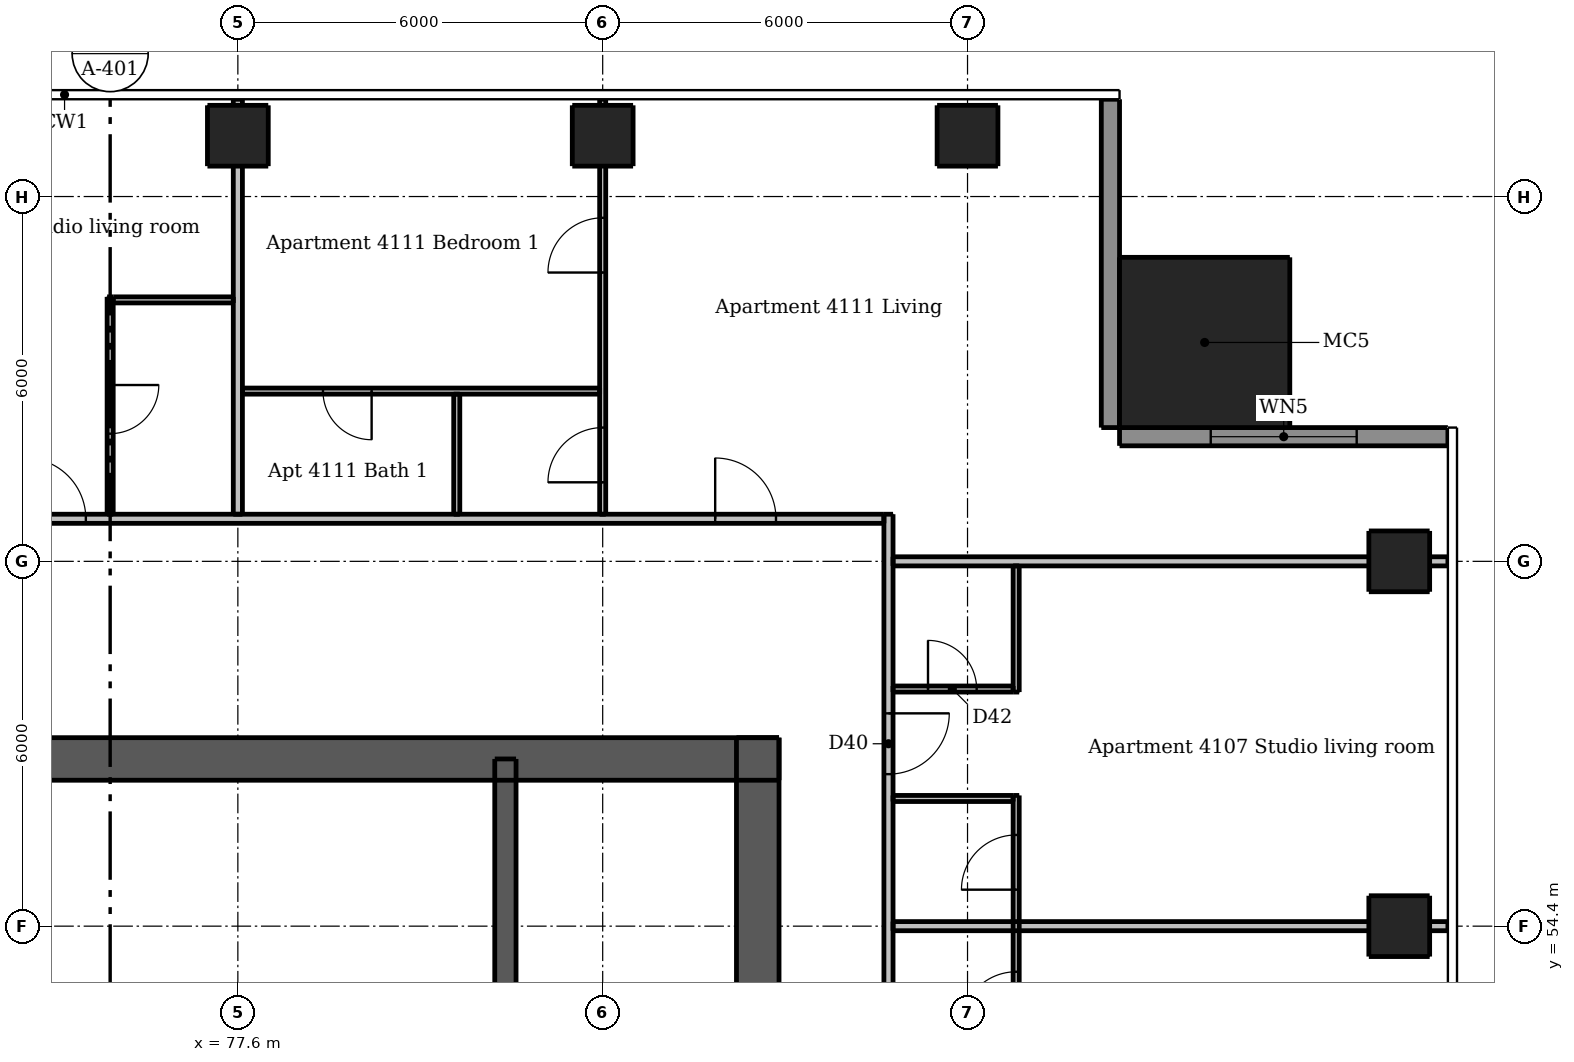
"""IFC4 building model, lengths in metres.
Left out: names, types, materials, properties, quantities, classifications, styles, units other than length and angle.
Written with IfcOpenShell. Run it as: python <this file> out.ifc"""

import sys

from ifc_helpers import new_model, si_unit, direction, frame, frame_2d, origin, origin_2d, place, context, subcontext, project, spatial, rectangle, extrude, element, fill, save


model = new_model("IFC4")
c1 = context("Model", 3, precision=1e-05, world=origin(), true_north=direction((0.0, 1.0)))
c2 = subcontext(c1, "Body", "Model", "MODEL_VIEW")
j1 = project(units=[si_unit("LENGTHUNIT", "METRE"), si_unit("PLANEANGLEUNIT", "RADIAN")], contexts=[c1])
p1 = place(None, origin())
s1 = spatial("IfcSite", under=j1, at=p1, CompositionType="ELEMENT")
p2 = place(p1, origin())
s2 = spatial("IfcBuilding", under=s1, at=p2, CompositionType="ELEMENT")
p3 = place(p2, frame((0.0, 0.0, 154.9)))
s3 = spatial("IfcBuildingStorey", under=s2, at=p3, CompositionType="ELEMENT", Elevation=154.9)
p4 = place(p3, frame((62.5, 57.15, 0.0), z_axis=(0.0, 0.0, 1.0), x_axis=(1.0, 0.0, 0.0)))
e1 = element("IfcWall", 1, at=p4, inside=s3, PredefinedType="SHEAR", context=c2, shape_type="SweptSolid", body=[
    extrude(rectangle(XDim=24.0, YDim=0.7, at=frame_2d((12.0, 0.0))), origin(), (0.0, 0.0, 1.0), 3.05),
])
p5 = place(p4, frame((20.938, 0.0, 0.0)))
e2 = element("IfcOpeningElement", 2, at=p5, cuts=e1, PredefinedType="OPENING", context=c2, shape_type="SweptSolid", body=[
    extrude(rectangle(XDim=1.1, YDim=2.1, at=frame_2d((0.55, 1.05))), frame((0.0, 0.36, 0.0), z_axis=(0.0, -1.0, 0.0), x_axis=(1.0, 0.0, 0.0)), (0.0, 0.0, 1.0), 0.72),
])
p6 = place(p4, frame((1.962, 0.0, 0.0)))
e3 = element("IfcOpeningElement", 3, at=p6, cuts=e1, PredefinedType="OPENING", context=c2, shape_type="SweptSolid", body=[
    extrude(rectangle(XDim=1.1, YDim=2.1, at=frame_2d((0.55, 1.05))), frame((0.0, 0.36, 0.0), z_axis=(0.0, -1.0, 0.0), x_axis=(1.0, 0.0, 0.0)), (0.0, 0.0, 1.0), 0.72),
])
p7 = place(p4, frame((11.55, 0.0, 0.0)))
e4 = element("IfcOpeningElement", 4, at=p7, cuts=e1, PredefinedType="OPENING", context=c2, shape_type="SweptSolid", body=[
    extrude(rectangle(XDim=0.9, YDim=2.1, at=frame_2d((0.45, 1.05))), frame((0.0, 0.36, 0.0), z_axis=(0.0, -1.0, 0.0), x_axis=(1.0, 0.0, 0.0)), (0.0, 0.0, 1.0), 0.72),
])
p8 = place(p3, frame((86.15, 33.5, 0.0), z_axis=(0.0, 0.0, 1.0), x_axis=(0.0, 1.0, 0.0)))
e5 = element("IfcWall", 5, at=p8, inside=s3, PredefinedType="SHEAR", context=c2, shape_type="SweptSolid", body=[
    extrude(rectangle(XDim=24.0, YDim=0.7, at=frame_2d((12.0, 0.0))), origin(), (0.0, 0.0, 1.0), 3.05),
])
p9 = place(p8, frame((11.2, 0.0, 0.0)))
e6 = element("IfcOpeningElement", 6, at=p9, cuts=e5, PredefinedType="OPENING", context=c2, shape_type="SweptSolid", body=[
    extrude(rectangle(XDim=1.6, YDim=2.1, at=frame_2d((0.8, 1.05))), frame((0.0, 0.36, 0.0), z_axis=(0.0, -1.0, 0.0), x_axis=(1.0, 0.0, 0.0)), (0.0, 0.0, 1.0), 0.72),
])
p10 = place(p3, frame((82.0, 47.1, 0.0), z_axis=(0.0, 0.0, 1.0), x_axis=(0.0, 1.0, 0.0)))
e7 = element("IfcWall", 7, at=p10, inside=s3, PredefinedType="SHEAR", context=c2, shape_type="SweptSolid", body=[
    extrude(rectangle(XDim=10.05, YDim=0.35, at=frame_2d((5.025, 0.0))), origin(), (0.0, 0.0, 1.0), 3.05),
])
for number, where, z_axis, x_axis in (
    (8, (96.7, 54.4, 0.0), (0.0, 0.0, 1.0), (1.0, 0.0, 0.0)),
    (9, (96.7, 60.4, 0.0), (0.0, 0.0, 1.0), (1.0, 0.0, 0.0)),
    (10, (77.6, 67.4, 0.0), (0.0, 0.0, 1.0), (1.0, 0.0, 0.0)),
    (11, (83.6, 67.4, 0.0), (0.0, 0.0, 1.0), (1.0, 0.0, 0.0)),
    (12, (89.6, 67.4, 0.0), (0.0, 0.0, 1.0), (1.0, 0.0, 0.0)),
):
    element("IfcColumn", number, at=place(p3, frame(where, z_axis=z_axis, x_axis=x_axis)), inside=s3, PredefinedType="COLUMN", context=c2, shape_type="SweptSolid", body=[
        extrude(rectangle(XDim=1.0, YDim=1.0, at=origin_2d()), origin(), (0.0, 0.0, 1.0), 3.05),
    ])
p11 = place(p3, frame((93.5, 64.0, 0.0), z_axis=(0.0, 0.0, 1.0), x_axis=(1.0, 0.0, 0.0)))
e13 = element("IfcColumn", 13, at=p11, inside=s3, PredefinedType="COLUMN", context=c2, shape_type="SweptSolid", body=[
    extrude(rectangle(XDim=2.8, YDim=2.8, at=origin_2d()), origin(), (0.0, 0.0, 1.0), 3.3),
])
p12 = place(p3, frame((97.5, 62.45, 0.0), z_axis=(0.0, 0.0, 1.0), x_axis=(-1.0, 0.0, 0.0)))
e14 = element("IfcWall", 14, at=p12, inside=s3, PredefinedType="SOLIDWALL", context=c2, shape_type="SweptSolid", body=[
    extrude(rectangle(XDim=5.4, YDim=0.3, at=frame_2d((2.7, 0.0))), origin(), (0.0, 0.0, 1.0), 3.05),
])
p13 = place(p12, frame((1.5, 0.0, 0.15)))
e15 = element("IfcOpeningElement", 15, at=p13, cuts=e14, PredefinedType="OPENING", context=c2, shape_type="SweptSolid", body=[
    extrude(rectangle(XDim=2.4, YDim=2.1, at=frame_2d((1.2, 1.05))), frame((0.0, 0.16, 0.0), z_axis=(0.0, -1.0, 0.0), x_axis=(1.0, 0.0, 0.0)), (0.0, 0.0, 1.0), 0.32),
])
p14 = place(p3, frame((91.95, 62.6, 0.0), z_axis=(0.0, 0.0, 1.0), x_axis=(0.0, 1.0, 0.0)))
e16 = element("IfcWall", 16, at=p14, inside=s3, PredefinedType="SOLIDWALL", context=c2, shape_type="SweptSolid", body=[
    extrude(rectangle(XDim=5.4, YDim=0.3, at=frame_2d((2.7, 0.0))), origin(), (0.0, 0.0, 1.0), 3.05),
])
p15 = place(p3, frame((75.5, 64.75, 0.0), z_axis=(0.0, 0.0, 1.0), x_axis=(0.0, -1.0, 0.0)))
e17 = element("IfcWall", 17, at=p15, inside=s3, PredefinedType="PARTITIONING", context=c2, shape_type="SweptSolid", body=[
    extrude(rectangle(XDim=3.575, YDim=0.1, at=frame_2d((1.788, 0.0))), origin(), (0.0, 0.0, 1.0), 3.05),
])
p16 = place(p15, frame((1.45, 0.0, 0.0)))
e18 = element("IfcOpeningElement", 18, at=p16, cuts=e17, PredefinedType="OPENING", context=c2, shape_type="SweptSolid", body=[
    extrude(rectangle(XDim=0.8, YDim=2.1, at=frame_2d((0.4, 1.05))), frame((0.0, 0.06, 0.0), z_axis=(0.0, -1.0, 0.0), x_axis=(1.0, 0.0, 0.0)), (0.0, 0.0, 1.0), 0.12),
])
p17 = place(p3, frame((81.2, 61.175, 0.0), z_axis=(0.0, 0.0, 1.0), x_axis=(0.0, 1.0, 0.0)))
e19 = element("IfcWall", 19, at=p17, inside=s3, PredefinedType="PARTITIONING", context=c2, shape_type="SweptSolid", body=[
    extrude(rectangle(XDim=1.975, YDim=0.1, at=frame_2d((0.987, 0.0))), origin(), (0.0, 0.0, 1.0), 3.05),
])
p18 = place(p3, frame((83.6, 61.175, 0.0), z_axis=(0.0, 0.0, 1.0), x_axis=(0.0, 1.0, 0.0)))
e20 = element("IfcWall", 20, at=p18, inside=s3, PredefinedType="PARTITIONING", context=c2, shape_type="SweptSolid", body=[
    extrude(rectangle(XDim=6.825, YDim=0.1, at=frame_2d((3.413, 0.0))), origin(), (0.0, 0.0, 1.0), 2.516),
])
p19 = place(p18, frame((0.525, 0.0, 0.0)))
e21 = element("IfcOpeningElement", 21, at=p19, cuts=e20, PredefinedType="OPENING", context=c2, shape_type="SweptSolid", body=[
    extrude(rectangle(XDim=0.9, YDim=2.1, at=frame_2d((0.45, 1.05))), frame((0.0, 0.06, 0.0), z_axis=(0.0, -1.0, 0.0), x_axis=(1.0, 0.0, 0.0)), (0.0, 0.0, 1.0), 0.12),
])
p20 = place(p18, frame((3.975, 0.0, 0.0)))
e22 = element("IfcOpeningElement", 22, at=p20, cuts=e20, PredefinedType="OPENING", context=c2, shape_type="SweptSolid", body=[
    extrude(rectangle(XDim=0.9, YDim=2.1, at=frame_2d((0.45, 1.05))), frame((0.0, 0.06, 0.0), z_axis=(0.0, -1.0, 0.0), x_axis=(1.0, 0.0, 0.0)), (0.0, 0.0, 1.0), 0.12),
])
p21 = place(p3, frame((90.4, 51.95, 0.0), z_axis=(0.0, 0.0, 1.0), x_axis=(0.0, 1.0, 0.0)))
e23 = element("IfcWall", 23, at=p21, inside=s3, PredefinedType="PARTITIONING", context=c2, shape_type="SweptSolid", body=[
    extrude(rectangle(XDim=4.6, YDim=0.1, at=frame_2d((2.3, 0.0))), origin(), (0.0, 0.0, 1.0), 3.05),
])
p22 = place(p21, frame((0.8, 0.0, 0.0)))
e24 = element("IfcOpeningElement", 24, at=p22, cuts=e23, PredefinedType="OPENING", context=c2, shape_type="SweptSolid", body=[
    extrude(rectangle(XDim=0.9, YDim=2.1, at=frame_2d((0.45, 1.05))), frame((0.0, 0.06, 0.0), z_axis=(0.0, -1.0, 0.0), x_axis=(1.0, 0.0, 0.0)), (0.0, 0.0, 1.0), 0.12),
])
p23 = place(p21, frame((3.05, 0.0, 0.0)))
e25 = element("IfcOpeningElement", 25, at=p23, cuts=e23, PredefinedType="OPENING", context=c2, shape_type="SweptSolid", body=[
    extrude(rectangle(XDim=0.9, YDim=2.1, at=frame_2d((0.45, 1.05))), frame((0.0, 0.06, 0.0), z_axis=(0.0, -1.0, 0.0), x_axis=(1.0, 0.0, 0.0)), (0.0, 0.0, 1.0), 0.12),
])
p24 = place(p3, frame((90.4, 58.25, 0.0), z_axis=(0.0, 0.0, 1.0), x_axis=(0.0, 1.0, 0.0)))
e26 = element("IfcWall", 26, at=p24, inside=s3, PredefinedType="PARTITIONING", context=c2, shape_type="SweptSolid", body=[
    extrude(rectangle(XDim=2.075, YDim=0.1, at=frame_2d((1.038, 0.0))), origin(), (0.0, 0.0, 1.0), 3.05),
])
p25 = place(p3, frame((75.55, 64.7, 0.0), z_axis=(0.0, 0.0, 1.0), x_axis=(1.0, 0.0, 0.0)))
e27 = element("IfcWall", 27, at=p25, inside=s3, PredefinedType="PARTITIONING", context=c2, shape_type="SweptSolid", body=[
    extrude(rectangle(XDim=1.975, YDim=0.1, at=frame_2d((0.987, 0.0))), origin(), (0.0, 0.0, 1.0), 3.05),
])
p26 = place(p3, frame((83.55, 63.2, 0.0), z_axis=(0.0, 0.0, 1.0), x_axis=(-1.0, 0.0, 0.0)))
e28 = element("IfcWall", 28, at=p26, inside=s3, PredefinedType="PARTITIONING", context=c2, shape_type="SweptSolid", body=[
    extrude(rectangle(XDim=5.875, YDim=0.1, at=frame_2d((2.938, 0.0))), origin(), (0.0, 0.0, 1.0), 3.05),
])
p27 = place(p26, frame((3.75, 0.0, 0.0)))
e29 = element("IfcOpeningElement", 29, at=p27, cuts=e28, PredefinedType="OPENING", context=c2, shape_type="SweptSolid", body=[
    extrude(rectangle(XDim=0.8, YDim=2.1, at=frame_2d((0.4, 1.05))), frame((0.0, 0.06, 0.0), z_axis=(0.0, -1.0, 0.0), x_axis=(1.0, 0.0, 0.0)), (0.0, 0.0, 1.0), 0.12),
])
p28 = place(p3, frame((88.375, 58.3, 0.0), z_axis=(0.0, 0.0, 1.0), x_axis=(1.0, 0.0, 0.0)))
e30 = element("IfcWall", 30, at=p28, inside=s3, PredefinedType="PARTITIONING", context=c2, shape_type="SweptSolid", body=[
    extrude(rectangle(XDim=1.975, YDim=0.1, at=frame_2d((0.988, 0.0))), origin(), (0.0, 0.0, 1.0), 3.05),
])
p29 = place(p28, frame((0.575, 0.0, 0.0)))
e31 = element("IfcOpeningElement", 31, at=p29, cuts=e30, PredefinedType="OPENING", context=c2, shape_type="SweptSolid", body=[
    extrude(rectangle(XDim=0.8, YDim=2.1, at=frame_2d((0.4, 1.05))), frame((0.0, 0.06, 0.0), z_axis=(0.0, -1.0, 0.0), x_axis=(1.0, 0.0, 0.0)), (0.0, 0.0, 1.0), 0.12),
])
p30 = place(p3, frame((88.375, 56.5, 0.0), z_axis=(0.0, 0.0, 1.0), x_axis=(1.0, 0.0, 0.0)))
e32 = element("IfcWall", 32, at=p30, inside=s3, PredefinedType="PARTITIONING", context=c2, shape_type="SweptSolid", body=[
    extrude(rectangle(XDim=1.975, YDim=0.1, at=frame_2d((0.988, 0.0))), origin(), (0.0, 0.0, 1.0), 3.05),
])
p31 = place(p3, frame((77.6, 61.175, 0.0), z_axis=(0.0, 0.0, 1.0), x_axis=(0.0, 1.0, 0.0)))
e33 = element("IfcWall", 33, at=p31, inside=s3, PredefinedType="PARTITIONING", context=c2, shape_type="SweptSolid", body=[
    extrude(rectangle(XDim=6.825, YDim=0.15, at=frame_2d((3.413, 0.0))), origin(), (0.0, 0.0, 1.0), 2.516),
])
p32 = place(p3, frame((88.3, 61.175, 0.0), z_axis=(0.0, 0.0, 1.0), x_axis=(0.0, -1.0, 0.0)))
e34 = element("IfcWall", 34, at=p32, inside=s3, PredefinedType="PARTITIONING", context=c2, shape_type="SweptSolid", body=[
    extrude(rectangle(XDim=29.4, YDim=0.15, at=frame_2d((14.7, 0.0))), origin(), (0.0, 0.0, 1.0), 3.05),
])
p33 = place(p32, frame((28.125, 0.0, 0.0)))
e35 = element("IfcOpeningElement", 35, at=p33, cuts=e34, PredefinedType="OPENING", context=c2, shape_type="SweptSolid", body=[
    extrude(rectangle(XDim=1.0, YDim=2.1, at=frame_2d((0.5, 1.05))), frame((0.0, 0.085, 0.0), z_axis=(0.0, -1.0, 0.0), x_axis=(1.0, 0.0, 0.0)), (0.0, 0.0, 1.0), 0.17),
])
p34 = place(p32, frame((18.275, 0.0, 0.0)))
e36 = element("IfcOpeningElement", 36, at=p34, cuts=e34, PredefinedType="OPENING", context=c2, shape_type="SweptSolid", body=[
    extrude(rectangle(XDim=1.0, YDim=2.1, at=frame_2d((0.5, 1.05))), frame((0.0, 0.085, 0.0), z_axis=(0.0, -1.0, 0.0), x_axis=(1.0, 0.0, 0.0)), (0.0, 0.0, 1.0), 0.17),
])
p35 = place(p32, frame((10.475, 0.0, 0.0)))
e37 = element("IfcOpeningElement", 37, at=p35, cuts=e34, PredefinedType="OPENING", context=c2, shape_type="SweptSolid", body=[
    extrude(rectangle(XDim=1.0, YDim=2.1, at=frame_2d((0.5, 1.05))), frame((0.0, 0.085, 0.0), z_axis=(0.0, -1.0, 0.0), x_axis=(1.0, 0.0, 0.0)), (0.0, 0.0, 1.0), 0.17),
])
p36 = place(p32, frame((3.275, 0.0, 0.0)))
e38 = element("IfcOpeningElement", 38, at=p36, cuts=e34, PredefinedType="OPENING", context=c2, shape_type="SweptSolid", body=[
    extrude(rectangle(XDim=1.0, YDim=2.1, at=frame_2d((0.5, 1.05))), frame((0.0, 0.085, 0.0), z_axis=(0.0, -1.0, 0.0), x_axis=(1.0, 0.0, 0.0)), (0.0, 0.0, 1.0), 0.17),
])
p37 = place(p3, frame((58.975, 61.1, 0.0), z_axis=(0.0, 0.0, 1.0), x_axis=(1.0, 0.0, 0.0)))
e39 = element("IfcWall", 39, at=p37, inside=s3, PredefinedType="PARTITIONING", context=c2, shape_type="SweptSolid", body=[
    extrude(rectangle(XDim=29.25, YDim=0.15, at=frame_2d((14.625, 0.0))), origin(), (0.0, 0.0, 1.0), 3.05),
])
p38 = place(p37, frame((3.125, 0.0, 0.0)))
e40 = element("IfcOpeningElement", 40, at=p38, cuts=e39, PredefinedType="OPENING", context=c2, shape_type="SweptSolid", body=[
    extrude(rectangle(XDim=1.0, YDim=2.1, at=frame_2d((0.5, 1.05))), frame((0.0, 0.085, 0.0), z_axis=(0.0, -1.0, 0.0), x_axis=(1.0, 0.0, 0.0)), (0.0, 0.0, 1.0), 0.17),
])
p39 = place(p37, frame((9.125, 0.0, 0.0)))
e41 = element("IfcOpeningElement", 41, at=p39, cuts=e39, PredefinedType="OPENING", context=c2, shape_type="SweptSolid", body=[
    extrude(rectangle(XDim=1.0, YDim=2.1, at=frame_2d((0.5, 1.05))), frame((0.0, 0.085, 0.0), z_axis=(0.0, -1.0, 0.0), x_axis=(1.0, 0.0, 0.0)), (0.0, 0.0, 1.0), 0.17),
])
p40 = place(p37, frame((15.125, 0.0, 0.0)))
e42 = element("IfcOpeningElement", 42, at=p40, cuts=e39, PredefinedType="OPENING", context=c2, shape_type="SweptSolid", body=[
    extrude(rectangle(XDim=1.0, YDim=2.1, at=frame_2d((0.5, 1.05))), frame((0.0, 0.085, 0.0), z_axis=(0.0, -1.0, 0.0), x_axis=(1.0, 0.0, 0.0)), (0.0, 0.0, 1.0), 0.17),
])
p41 = place(p37, frame((26.475, 0.0, 0.0)))
e43 = element("IfcOpeningElement", 43, at=p41, cuts=e39, PredefinedType="OPENING", context=c2, shape_type="SweptSolid", body=[
    extrude(rectangle(XDim=1.0, YDim=2.1, at=frame_2d((0.5, 1.05))), frame((0.0, 0.085, 0.0), z_axis=(0.0, -1.0, 0.0), x_axis=(1.0, 0.0, 0.0)), (0.0, 0.0, 1.0), 0.17),
])
p42 = place(p3, frame((88.375, 60.4, 0.0), z_axis=(0.0, 0.0, 1.0), x_axis=(1.0, 0.0, 0.0)))
e44 = element("IfcWall", 44, at=p42, inside=s3, PredefinedType="PARTITIONING", context=c2, shape_type="SweptSolid", body=[
    extrude(rectangle(XDim=9.125, YDim=0.15, at=frame_2d((4.562, 0.0))), origin(), (0.0, 0.0, 1.0), 2.647),
])
p43 = place(p3, frame((88.375, 54.4, 0.0), z_axis=(0.0, 0.0, 1.0), x_axis=(1.0, 0.0, 0.0)))
e45 = element("IfcWall", 45, at=p43, inside=s3, PredefinedType="PARTITIONING", context=c2, shape_type="SweptSolid", body=[
    extrude(rectangle(XDim=9.125, YDim=0.15, at=frame_2d((4.562, 0.0))), origin(), (0.0, 0.0, 1.0), 2.516),
])
p44 = place(p13, origin())
e46 = element("IfcWindow", 46, at=p44, inside=s3, PartitioningType="DOUBLE_PANEL_VERTICAL", PredefinedType="WINDOW", context=c2, shape_type="SweptSolid", body=[
    extrude(rectangle(XDim=2.4, YDim=2.1, at=frame_2d((1.2, 1.05))), frame((0.0, 0.03, 0.0), z_axis=(0.0, -1.0, 0.0), x_axis=(1.0, 0.0, 0.0)), (0.0, 0.0, 1.0), 0.06),
])
fill(e15, e46)
p45 = place(p5, origin())
e47 = element("IfcDoor", 47, at=p45, inside=s3, OperationType="SINGLE_SWING_RIGHT", PredefinedType="DOOR", context=c2, shape_type="SweptSolid", body=[
    extrude(rectangle(XDim=1.1, YDim=2.1, at=frame_2d((0.55, 1.05))), frame((0.0, -0.288, 0.0), z_axis=(0.0, -1.0, 0.0), x_axis=(1.0, 0.0, 0.0)), (0.0, 0.0, 1.0), 0.05),
])
fill(e2, e47)
p46 = place(p7, origin())
e48 = element("IfcDoor", 48, at=p46, inside=s3, OperationType="SINGLE_SWING_RIGHT", PredefinedType="DOOR", context=c2, shape_type="SweptSolid", body=[
    extrude(rectangle(XDim=0.9, YDim=2.1, at=frame_2d((0.45, 1.05))), frame((0.0, -0.288, 0.0), z_axis=(0.0, -1.0, 0.0), x_axis=(1.0, 0.0, 0.0)), (0.0, 0.0, 1.0), 0.05),
])
fill(e4, e48)
p47 = place(p22, origin())
e49 = element("IfcDoor", 49, at=p47, inside=s3, OperationType="SINGLE_SWING_LEFT", PredefinedType="DOOR", context=c2, shape_type="SweptSolid", body=[
    extrude(rectangle(XDim=0.9, YDim=2.1, at=frame_2d((0.45, 1.05))), frame((0.0, 0.025, 0.0), z_axis=(0.0, -1.0, 0.0), x_axis=(1.0, 0.0, 0.0)), (0.0, 0.0, 1.0), 0.05),
])
fill(e24, e49)
p48 = place(p36, origin())
e50 = element("IfcDoor", 50, at=p48, inside=s3, OperationType="SINGLE_SWING_LEFT", PredefinedType="DOOR", context=c2, shape_type="SweptSolid", body=[
    extrude(rectangle(XDim=1.0, YDim=2.1, at=frame_2d((0.5, 1.05))), frame((0.0, 0.025, 0.0), z_axis=(0.0, -1.0, 0.0), x_axis=(1.0, 0.0, 0.0)), (0.0, 0.0, 1.0), 0.05),
])
fill(e38, e50)
p49 = place(p23, origin())
e51 = element("IfcDoor", 51, at=p49, inside=s3, OperationType="SINGLE_SWING_LEFT", PredefinedType="DOOR", context=c2, shape_type="SweptSolid", body=[
    extrude(rectangle(XDim=0.9, YDim=2.1, at=frame_2d((0.45, 1.05))), frame((0.0, 0.025, 0.0), z_axis=(0.0, -1.0, 0.0), x_axis=(1.0, 0.0, 0.0)), (0.0, 0.0, 1.0), 0.05),
])
fill(e25, e51)
p50 = place(p29, origin())
e52 = element("IfcDoor", 52, at=p50, inside=s3, OperationType="SINGLE_SWING_LEFT", PredefinedType="DOOR", context=c2, shape_type="SweptSolid", body=[
    extrude(rectangle(XDim=0.8, YDim=2.1, at=frame_2d((0.4, 1.05))), frame((0.0, 0.025, 0.0), z_axis=(0.0, -1.0, 0.0), x_axis=(1.0, 0.0, 0.0)), (0.0, 0.0, 1.0), 0.05),
])
fill(e31, e52)
p51 = place(p40, origin())
e53 = element("IfcDoor", 53, at=p51, inside=s3, OperationType="SINGLE_SWING_LEFT", PredefinedType="DOOR", context=c2, shape_type="SweptSolid", body=[
    extrude(rectangle(XDim=1.0, YDim=2.1, at=frame_2d((0.5, 1.05))), frame((0.0, 0.025, 0.0), z_axis=(0.0, -1.0, 0.0), x_axis=(1.0, 0.0, 0.0)), (0.0, 0.0, 1.0), 0.05),
])
fill(e42, e53)
p52 = place(p16, origin())
e54 = element("IfcDoor", 54, at=p52, inside=s3, OperationType="SINGLE_SWING_LEFT", PredefinedType="DOOR", context=c2, shape_type="SweptSolid", body=[
    extrude(rectangle(XDim=0.8, YDim=2.1, at=frame_2d((0.4, 1.05))), frame((0.0, 0.025, 0.0), z_axis=(0.0, -1.0, 0.0), x_axis=(1.0, 0.0, 0.0)), (0.0, 0.0, 1.0), 0.05),
])
fill(e18, e54)
p53 = place(p41, origin())
e55 = element("IfcDoor", 55, at=p53, inside=s3, OperationType="SINGLE_SWING_LEFT", PredefinedType="DOOR", context=c2, shape_type="SweptSolid", body=[
    extrude(rectangle(XDim=1.0, YDim=2.1, at=frame_2d((0.5, 1.05))), frame((0.0, 0.025, 0.0), z_axis=(0.0, -1.0, 0.0), x_axis=(1.0, 0.0, 0.0)), (0.0, 0.0, 1.0), 0.05),
])
fill(e43, e55)
p54 = place(p19, origin())
e56 = element("IfcDoor", 56, at=p54, inside=s3, OperationType="SINGLE_SWING_LEFT", PredefinedType="DOOR", context=c2, shape_type="SweptSolid", body=[
    extrude(rectangle(XDim=0.9, YDim=2.1, at=frame_2d((0.45, 1.05))), frame((0.0, 0.025, 0.0), z_axis=(0.0, -1.0, 0.0), x_axis=(1.0, 0.0, 0.0)), (0.0, 0.0, 1.0), 0.05),
])
fill(e21, e56)
p55 = place(p20, origin())
e57 = element("IfcDoor", 57, at=p55, inside=s3, OperationType="SINGLE_SWING_LEFT", PredefinedType="DOOR", context=c2, shape_type="SweptSolid", body=[
    extrude(rectangle(XDim=0.9, YDim=2.1, at=frame_2d((0.45, 1.05))), frame((0.0, 0.025, 0.0), z_axis=(0.0, -1.0, 0.0), x_axis=(1.0, 0.0, 0.0)), (0.0, 0.0, 1.0), 0.05),
])
fill(e22, e57)
p56 = place(p27, origin())
e58 = element("IfcDoor", 58, at=p56, inside=s3, OperationType="SINGLE_SWING_LEFT", PredefinedType="DOOR", context=c2, shape_type="SweptSolid", body=[
    extrude(rectangle(XDim=0.8, YDim=2.1, at=frame_2d((0.4, 1.05))), frame((0.0, 0.025, 0.0), z_axis=(0.0, -1.0, 0.0), x_axis=(1.0, 0.0, 0.0)), (0.0, 0.0, 1.0), 0.05),
])
fill(e29, e58)
save(model, sys.argv[1])
